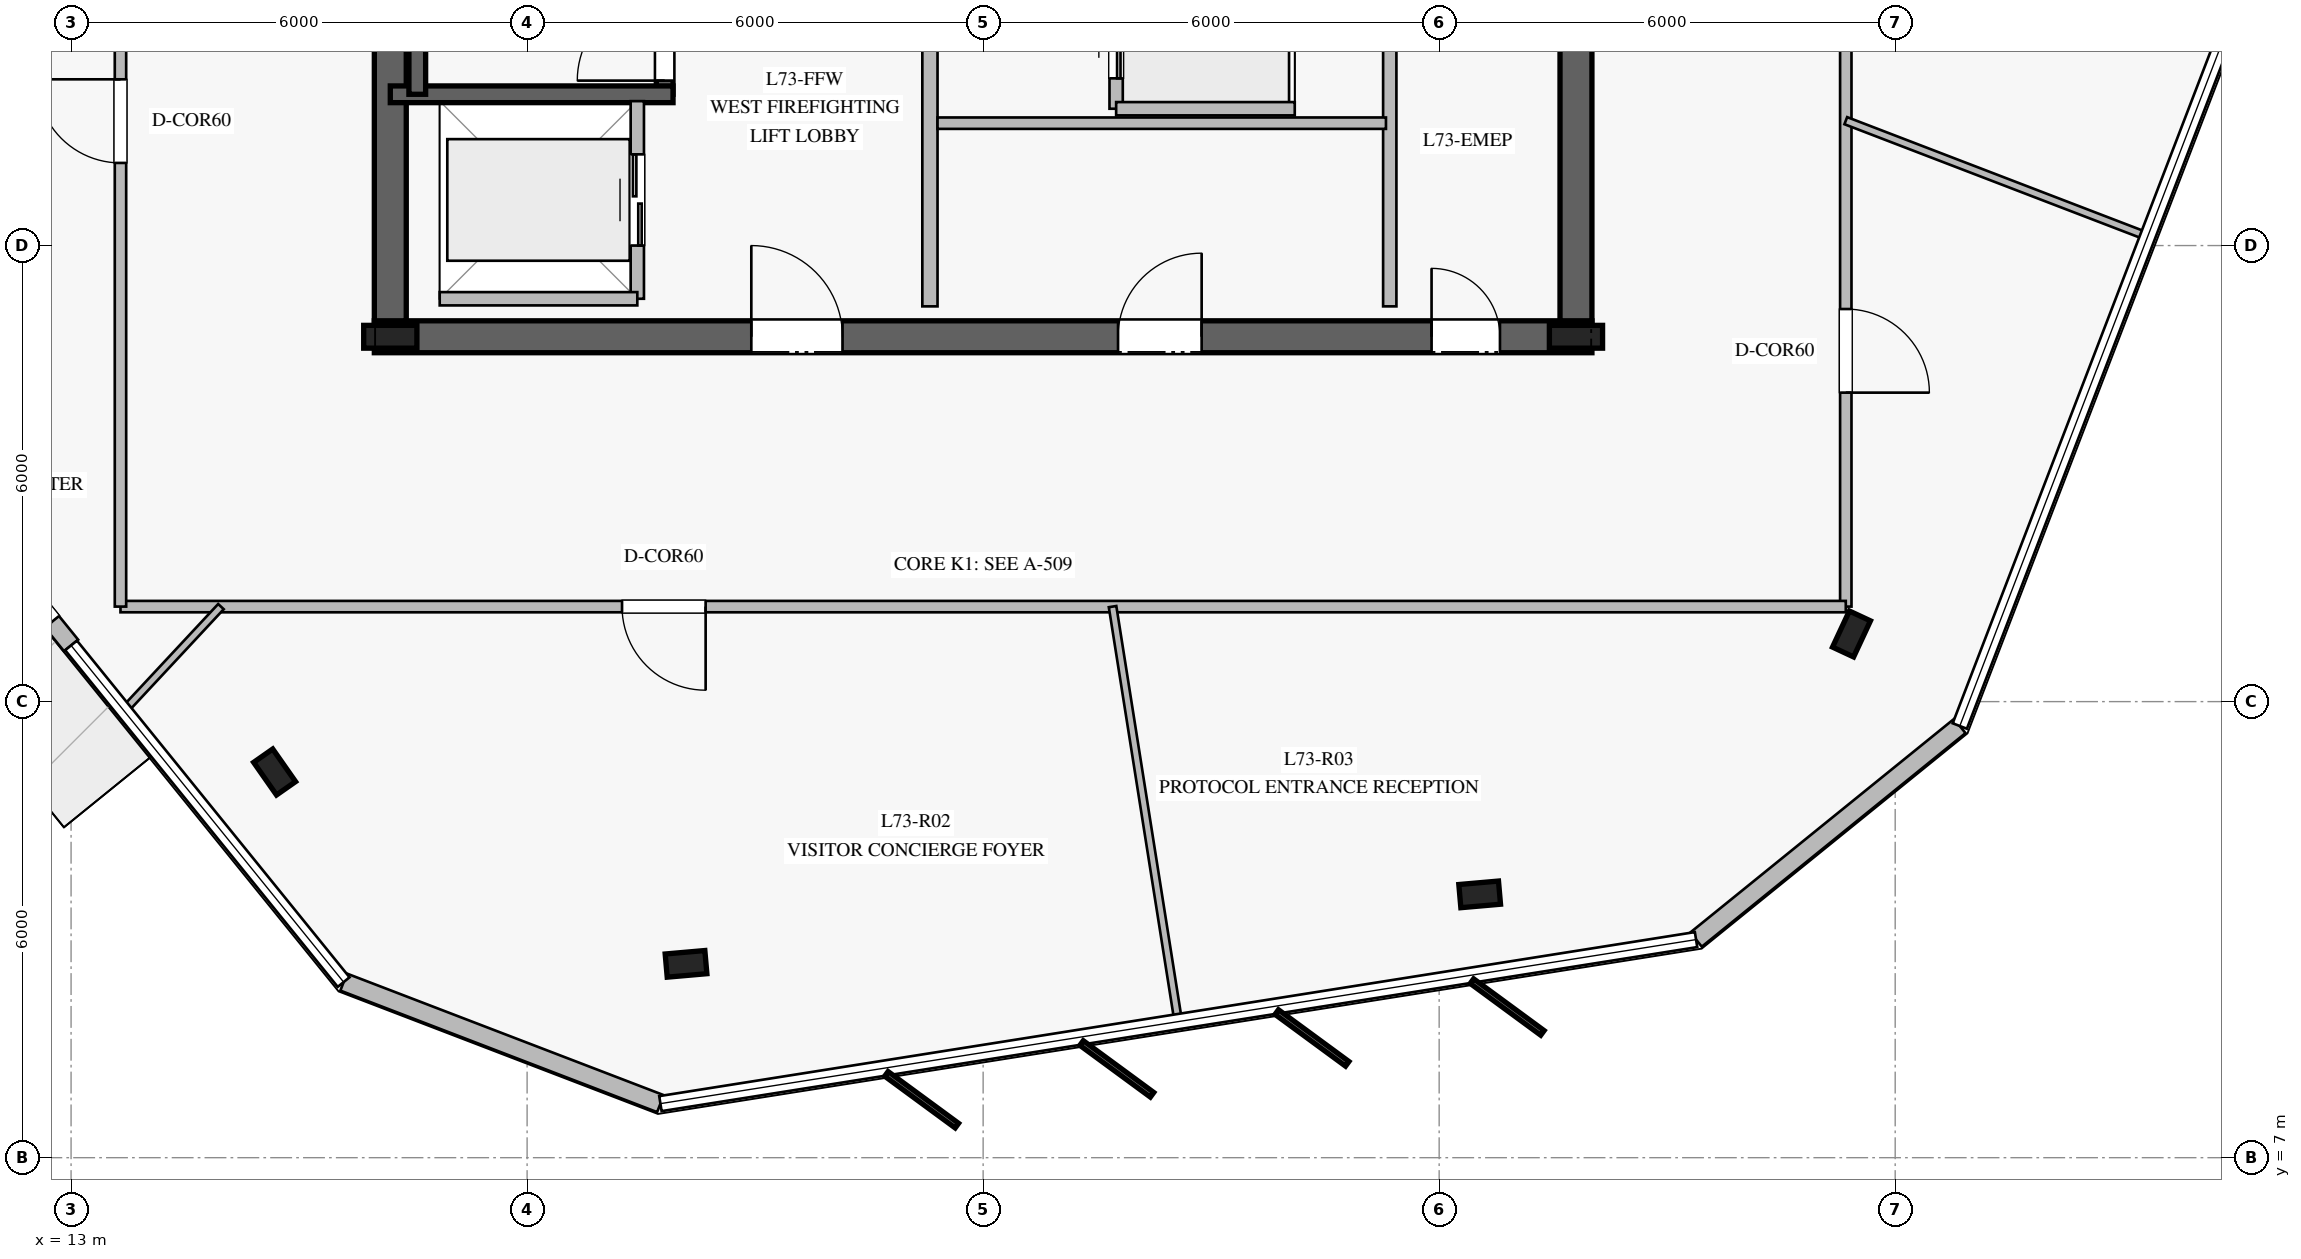
"""IFC4 building model, lengths in metres.
Left out: names, types, materials, properties, quantities, classifications, styles, units other than length and angle.
Written with IfcOpenShell. Run it as: python <this file> out.ifc"""

import sys

from ifc_helpers import new_model, si_unit, direction, frame, frame_2d, origin, origin_2d, place, context, subcontext, project, spatial, rectangle, i_section, extrude, element, fill, save


model = new_model("IFC4")
c1 = context("Model", 3, precision=1e-05, world=origin(), true_north=direction((0.0, 1.0)))
c2 = subcontext(c1, "Body", "Model", "MODEL_VIEW")
j1 = project(units=[si_unit("LENGTHUNIT", "METRE"), si_unit("PLANEANGLEUNIT", "RADIAN")], contexts=[c1])
p1 = place(None, origin())
s1 = spatial("IfcSite", under=j1, at=p1, CompositionType="ELEMENT")
p2 = place(p1, origin())
s2 = spatial("IfcBuilding", under=s1, at=p2, CompositionType="ELEMENT")
p3 = place(p2, frame((0.0, 0.0, 302.2)))
s3 = spatial("IfcBuildingStorey", under=s2, at=p3, CompositionType="ELEMENT", Elevation=302.2)
p4 = place(p3, frame((16.99, 17.8, 0.0), z_axis=(0.0, 0.0, 1.0), x_axis=(1.0, 0.0, 0.0)))
e1 = element("IfcWall", 1, at=p4, inside=s3, PredefinedType="SHEAR", context=c2, shape_type="SweptSolid", body=[
    extrude(rectangle(XDim=16.02, YDim=0.42, at=frame_2d((8.01, 0.0))), origin(), (0.0, 0.0, 1.0), 3.78),
])
p5 = place(p4, frame((4.96, 0.0, 0.0)))
e2 = element("IfcOpeningElement", 2, at=p5, cuts=e1, PredefinedType="OPENING", context=c2, shape_type="SweptSolid", body=[
    extrude(rectangle(XDim=1.2, YDim=2.25, at=frame_2d((0.6, 1.125))), frame((0.0, 0.22, 0.0), z_axis=(0.0, -1.0, 0.0), x_axis=(1.0, 0.0, 0.0)), (0.0, 0.0, 1.0), 0.44),
])
p6 = place(p4, frame((13.91, 0.0, 0.0)))
e3 = element("IfcOpeningElement", 3, at=p6, cuts=e1, PredefinedType="OPENING", context=c2, shape_type="SweptSolid", body=[
    extrude(rectangle(XDim=0.9, YDim=2.1, at=frame_2d((0.45, 1.05))), frame((0.0, 0.22, 0.0), z_axis=(0.0, -1.0, 0.0), x_axis=(1.0, 0.0, 0.0)), (0.0, 0.0, 1.0), 0.44),
])
p7 = place(p4, frame((9.785, 0.0, 0.0)))
e4 = element("IfcOpeningElement", 4, at=p7, cuts=e1, PredefinedType="OPENING", context=c2, shape_type="SweptSolid", body=[
    extrude(rectangle(XDim=1.1, YDim=2.2, at=frame_2d((0.55, 1.1))), frame((0.0, 0.22, 0.0), z_axis=(0.0, -1.0, 0.0), x_axis=(1.0, 0.0, 0.0)), (0.0, 0.0, 1.0), 0.44),
])
p8 = place(p3, frame((17.2, 31.99, 0.0), z_axis=(0.0, 0.0, 1.0), x_axis=(0.0, -1.0, 0.0)))
e5 = element("IfcWall", 5, at=p8, inside=s3, PredefinedType="SHEAR", context=c2, shape_type="SweptSolid", body=[
    extrude(rectangle(XDim=13.98, YDim=0.42, at=frame_2d((6.99, 0.0))), origin(), (0.0, 0.0, 1.0), 3.78),
])
p9 = place(p8, frame((2.14, 0.0, 0.0)))
e6 = element("IfcOpeningElement", 6, at=p9, cuts=e5, PredefinedType="OPENING", context=c2, shape_type="SweptSolid", body=[
    extrude(rectangle(XDim=1.5, YDim=2.2, at=frame_2d((0.75, 1.1))), frame((0.0, 0.22, 0.0), z_axis=(0.0, -1.0, 0.0), x_axis=(1.0, 0.0, 0.0)), (0.0, 0.0, 1.0), 0.44),
])
p10 = place(p3, frame((32.8, 18.01, 0.0), z_axis=(0.0, 0.0, 1.0), x_axis=(0.0, 1.0, 0.0)))
e7 = element("IfcWall", 7, at=p10, inside=s3, PredefinedType="SHEAR", context=c2, shape_type="SweptSolid", body=[
    extrude(rectangle(XDim=13.98, YDim=0.42, at=frame_2d((6.99, 0.0))), origin(), (0.0, 0.0, 1.0), 3.78),
])
for number, where, z_axis, x_axis in (
    (8, (17.2, 17.8, 0.0), (0.0, 0.0, 1.0), (1.0, 0.0, 0.0)),
    (9, (32.8, 17.8, 0.0), (0.0, 0.0, 1.0), (1.0, 0.0, 0.0)),
):
    element("IfcColumn", number, at=place(p3, frame(where, z_axis=z_axis, x_axis=x_axis)), inside=s3, PredefinedType="COLUMN", context=c2, shape_type="SweptSolid", body=[
        extrude(i_section(OverallWidth=0.3, OverallDepth=0.7, WebThickness=0.017, FlangeThickness=0.032, at=origin_2d()), origin(), (0.0, 0.0, 1.0), 4.0),
    ])
p11 = place(p3, frame((20.81, 20.99, 0.0), z_axis=(0.0, 0.0, 1.0), x_axis=(0.0, 1.0, 0.0)))
e10 = element("IfcWall", 10, at=p11, inside=s3, PredefinedType="SOLIDWALL", context=c2, shape_type="SweptSolid", body=[
    extrude(rectangle(XDim=7.22, YDim=0.22, at=frame_2d((3.61, 0.0))), origin(), (0.0, 0.0, 1.0), 3.78),
])
p12 = place(p11, frame((0.18, 0.0, 0.0)))
e11 = element("IfcOpeningElement", 11, at=p12, cuts=e10, PredefinedType="OPENING", context=c2, shape_type="SweptSolid", body=[
    extrude(rectangle(XDim=1.15, YDim=2.2, at=frame_2d((0.575, 1.1))), frame((0.0, 0.12, 0.0), z_axis=(0.0, -1.0, 0.0), x_axis=(1.0, 0.0, 0.0)), (0.0, 0.0, 1.0), 0.24),
])
p13 = place(p3, frame((17.2, 20.99, 0.0), z_axis=(0.0, 0.0, 1.0), x_axis=(1.0, 0.0, 0.0)))
e12 = element("IfcWall", 12, at=p13, inside=s3, PredefinedType="SOLIDWALL", context=c2, shape_type="SweptSolid", body=[
    extrude(rectangle(XDim=3.72, YDim=0.22, at=frame_2d((1.86, 0.0))), origin(), (0.0, 0.0, 1.0), 3.78),
])
p14 = place(p3, frame((17.555, 28.21, 0.0), z_axis=(0.0, 0.0, 1.0), x_axis=(0.0, -1.0, 0.0)))
e13 = element("IfcWall", 13, at=p14, inside=s3, PredefinedType="SOLIDWALL", context=c2, shape_type="SweptSolid", body=[
    extrude(rectangle(XDim=7.22, YDim=0.22, at=frame_2d((3.61, 0.0))), origin(), (0.0, 0.0, 1.0), 3.78),
])
for number, where, z_axis, x_axis in (
    (14, (15.678, 12.074, 0.0), (0.0, 0.0, 1.0), (-0.574, 0.819, 0.0)),
    (15, (21.091, 9.55, 0.0), (0.0, 0.0, 1.0), (0.996, 0.087, 0.0)),
    (16, (31.533, 10.464, 0.0), (0.0, 0.0, 1.0), (0.996, 0.087, 0.0)),
    (17, (36.425, 13.89, 0.0), (0.0, 0.0, 1.0), (0.423, 0.906, 0.0)),
):
    element("IfcColumn", number, at=place(p3, frame(where, z_axis=z_axis, x_axis=x_axis)), inside=s3, PredefinedType="COLUMN", context=c2, shape_type="SweptSolid", body=[
        extrude(i_section(OverallWidth=0.306, OverallDepth=0.524, WebThickness=0.021, FlangeThickness=0.04, at=origin_2d()), origin(), (0.0, 0.0, 1.0), 4.0),
    ])
p15 = place(p3, frame((11.489, 15.604, 0.0), z_axis=(0.0, 0.0, 1.0), x_axis=(0.629508336797, -0.776993728355, 0.0)))
e18 = element("IfcWall", 18, at=p15, inside=s3, PredefinedType="STANDARD", context=c2, shape_type="SweptSolid", body=[
    extrude(rectangle(XDim=2.4, YDim=0.24, at=frame_2d((1.2, 0.0))), origin(), (0.0, 0.0, 1.0), 3.78),
])
p16 = place(p15, frame((0.4, 0.0, 0.0)))
e19 = element("IfcOpeningElement", 19, at=p16, cuts=e18, PredefinedType="OPENING", context=c2, shape_type="SweptSolid", body=[
    extrude(rectangle(XDim=1.6, YDim=2.25, at=frame_2d((0.8, 1.125))), frame((0.0, 0.13, 0.0), z_axis=(0.0, -1.0, 0.0), x_axis=(1.0, 0.0, 0.0)), (0.0, 0.0, 1.0), 0.26),
])
p17 = place(p3, frame((16.586, 9.31, 0.0), z_axis=(0.0, 0.0, 1.0), x_axis=(0.933641283133, -0.358209372336, 0.0)))
e20 = element("IfcWall", 20, at=p17, inside=s3, PredefinedType="STANDARD", context=c2, shape_type="SweptSolid", body=[
    extrude(rectangle(XDim=4.464, YDim=0.24, at=frame_2d((2.232, 0.0))), origin(), (0.0, 0.0, 1.0), 3.78),
])
p18 = place(p3, frame((34.38, 9.869, 0.0), z_axis=(0.0, 0.0, 1.0), x_axis=(0.777153187888, 0.629311467046, 0.0)))
e21 = element("IfcWall", 21, at=p18, inside=s3, PredefinedType="STANDARD", context=c2, shape_type="SweptSolid", body=[
    extrude(rectangle(XDim=4.465, YDim=0.24, at=frame_2d((2.233, 0.0))), origin(), (0.0, 0.0, 1.0), 3.78),
])
p19 = place(p3, frame((24.3, 18.2, 0.0), z_axis=(0.0, 0.0, 1.0), x_axis=(0.0, 1.0, 0.0)))
e22 = element("IfcWall", 22, at=p19, inside=s3, PredefinedType="PARTITIONING", context=c2, shape_type="SweptSolid", body=[
    extrude(rectangle(XDim=5.15, YDim=0.2, at=frame_2d((2.575, 0.0))), origin(), (0.0, 0.0, 1.0), 3.78),
])
p20 = place(p3, frame((30.35, 18.2, 0.0), z_axis=(0.0, 0.0, 1.0), x_axis=(0.0, 1.0, 0.0)))
e23 = element("IfcWall", 23, at=p20, inside=s3, PredefinedType="PARTITIONING", context=c2, shape_type="SweptSolid", body=[
    extrude(rectangle(XDim=3.48, YDim=0.175, at=frame_2d((1.74, 0.0))), origin(), (0.0, 0.0, 1.0), 3.78),
])
p21 = place(p3, frame((24.4, 20.61, 0.0), z_axis=(0.0, 0.0, 1.0), x_axis=(1.0, 0.0, 0.0)))
e24 = element("IfcWall", 24, at=p21, inside=s3, PredefinedType="PARTITIONING", context=c2, shape_type="SweptSolid", body=[
    extrude(rectangle(XDim=5.9, YDim=0.15, at=frame_2d((2.95, 0.0))), origin(), (0.0, 0.0, 1.0), 3.78),
])
p22 = place(p3, frame((26.75, 20.8, 0.0), z_axis=(0.0, 0.0, 1.0), x_axis=(0.0, 1.0, 0.0)))
e25 = element("IfcWall", 25, at=p22, inside=s3, PredefinedType="PARTITIONING", context=c2, shape_type="SweptSolid", body=[
    extrude(rectangle(XDim=1.9, YDim=0.175, at=frame_2d((0.95, 0.0))), origin(), (0.0, 0.0, 1.0), 3.78),
])
p23 = place(p22, frame((0.4, 0.0, 0.0)))
e26 = element("IfcOpeningElement", 26, at=p23, cuts=e25, PredefinedType="OPENING", context=c2, shape_type="SweptSolid", body=[
    extrude(rectangle(XDim=1.1, YDim=2.2, at=frame_2d((0.55, 1.1))), frame((0.0, 0.098, 0.0), z_axis=(0.0, -1.0, 0.0), x_axis=(1.0, 0.0, 0.0)), (0.0, 0.0, 1.0), 0.195),
])
p24 = place(p3, frame((26.75, 20.8, 0.0), z_axis=(0.0, 0.0, 1.0), x_axis=(1.0, 0.0, 0.0)))
e27 = element("IfcWall", 27, at=p24, inside=s3, PredefinedType="PARTITIONING", context=c2, shape_type="SweptSolid", body=[
    extrude(rectangle(XDim=2.35, YDim=0.175, at=frame_2d((1.175, 0.0))), origin(), (0.0, 0.0, 1.0), 3.78),
])
p25 = place(p3, frame((20.45, 18.3, 0.0), z_axis=(0.0, 0.0, 1.0), x_axis=(0.0, 1.0, 0.0)))
e28 = element("IfcWall", 28, at=p25, inside=s3, PredefinedType="PARTITIONING", context=c2, shape_type="SweptSolid", body=[
    extrude(rectangle(XDim=2.6, YDim=0.175, at=frame_2d((1.3, 0.0))), origin(), (0.0, 0.0, 1.0), 3.78),
])
p26 = place(p25, frame((0.7, 0.0, 0.0)))
e29 = element("IfcOpeningElement", 29, at=p26, cuts=e28, PredefinedType="OPENING", context=c2, shape_type="SweptSolid", body=[
    extrude(rectangle(XDim=1.2, YDim=2.2, at=frame_2d((0.6, 1.1))), frame((0.0, 0.098, 0.0), z_axis=(0.0, -1.0, 0.0), x_axis=(1.0, 0.0, 0.0)), (0.0, 0.0, 1.0), 0.195),
])
p27 = place(p3, frame((17.85, 18.3, 0.0), z_axis=(0.0, 0.0, 1.0), x_axis=(1.0, 0.0, 0.0)))
e30 = element("IfcWall", 30, at=p27, inside=s3, PredefinedType="PARTITIONING", context=c2, shape_type="SweptSolid", body=[
    extrude(rectangle(XDim=2.6, YDim=0.175, at=frame_2d((1.3, 0.0))), origin(), (0.0, 0.0, 1.0), 3.78),
])
p28 = place(p3, frame((36.35, 35.75, 0.0), z_axis=(0.0, 0.0, 1.0), x_axis=(0.0, -1.0, 0.0)))
e31 = element("IfcWall", 31, at=p28, inside=s3, PredefinedType="PARTITIONING", context=c2, shape_type="SweptSolid", body=[
    extrude(rectangle(XDim=21.5, YDim=0.15, at=frame_2d((10.75, 0.0))), origin(), (0.0, 0.0, 1.0), 3.05),
])
p29 = place(p28, frame((17.585, 0.0, 0.0)))
e32 = element("IfcOpeningElement", 32, at=p29, cuts=e31, PredefinedType="OPENING", context=c2, shape_type="SweptSolid", body=[
    extrude(rectangle(XDim=1.1, YDim=2.2, at=frame_2d((0.55, 1.1))), frame((0.0, 0.085, 0.0), z_axis=(0.0, -1.0, 0.0), x_axis=(1.0, 0.0, 0.0)), (0.0, 0.0, 1.0), 0.17),
])
p30 = place(p28, frame((8.868, 0.0, 0.0)))
e33 = element("IfcOpeningElement", 33, at=p30, cuts=e31, PredefinedType="OPENING", context=c2, shape_type="SweptSolid", body=[
    extrude(rectangle(XDim=1.1, YDim=2.2, at=frame_2d((0.55, 1.1))), frame((0.0, 0.085, 0.0), z_axis=(0.0, -1.0, 0.0), x_axis=(1.0, 0.0, 0.0)), (0.0, 0.0, 1.0), 0.17),
])
p31 = place(p3, frame((36.35, 14.25, 0.0), z_axis=(0.0, 0.0, 1.0), x_axis=(-1.0, 0.0, 0.0)))
e34 = element("IfcWall", 34, at=p31, inside=s3, PredefinedType="PARTITIONING", context=c2, shape_type="SweptSolid", body=[
    extrude(rectangle(XDim=22.7, YDim=0.15, at=frame_2d((11.35, 0.0))), origin(), (0.0, 0.0, 1.0), 3.27),
])
p32 = place(p31, frame((15.001, 0.0, 0.0)))
e35 = element("IfcOpeningElement", 35, at=p32, cuts=e34, PredefinedType="OPENING", context=c2, shape_type="SweptSolid", body=[
    extrude(rectangle(XDim=1.1, YDim=2.2, at=frame_2d((0.55, 1.1))), frame((0.0, 0.085, 0.0), z_axis=(0.0, -1.0, 0.0), x_axis=(1.0, 0.0, 0.0)), (0.0, 0.0, 1.0), 0.17),
])
p33 = place(p3, frame((13.65, 14.25, 0.0), z_axis=(0.0, 0.0, 1.0), x_axis=(0.0, 1.0, 0.0)))
e36 = element("IfcWall", 36, at=p33, inside=s3, PredefinedType="PARTITIONING", context=c2, shape_type="SweptSolid", body=[
    extrude(rectangle(XDim=21.5, YDim=0.15, at=frame_2d((10.75, 0.0))), origin(), (0.0, 0.0, 1.0), 3.05),
])
p34 = place(p33, frame((5.837, 0.0, 0.0)))
e37 = element("IfcOpeningElement", 37, at=p34, cuts=e36, PredefinedType="OPENING", context=c2, shape_type="SweptSolid", body=[
    extrude(rectangle(XDim=1.1, YDim=2.2, at=frame_2d((0.55, 1.1))), frame((0.0, 0.085, 0.0), z_axis=(0.0, -1.0, 0.0), x_axis=(1.0, 0.0, 0.0)), (0.0, 0.0, 1.0), 0.17),
])
p35 = place(p3, frame((14.972, 14.25, 0.0), z_axis=(0.0, 0.0, 1.0), x_axis=(-0.681882363678, -0.731461852802, 0.0)))
e38 = element("IfcWall", 38, at=p35, inside=s3, PredefinedType="MOVABLE", context=c2, shape_type="SweptSolid", body=[
    extrude(rectangle(XDim=1.856, YDim=0.1, at=frame_2d((0.928, 0.0))), origin(), (0.0, 0.0, 1.0), 3.27),
])
p36 = place(p3, frame((26.703, 14.25, 0.0), z_axis=(0.0, 0.0, 1.0), x_axis=(0.156399265173, -0.987693915063, 0.0)))
e39 = element("IfcWall", 39, at=p36, inside=s3, PredefinedType="MOVABLE", context=c2, shape_type="SweptSolid", body=[
    extrude(rectangle(XDim=5.512, YDim=0.1, at=frame_2d((2.756, 0.0))), origin(), (0.0, 0.0, 1.0), 3.28),
])
p37 = place(p3, frame((36.35, 20.643, 0.0), z_axis=(0.0, 0.0, 1.0), x_axis=(0.933566635169, -0.358403875117, 0.0)))
e40 = element("IfcWall", 40, at=p37, inside=s3, PredefinedType="MOVABLE", context=c2, shape_type="SweptSolid", body=[
    extrude(rectangle(XDim=4.238, YDim=0.1, at=frame_2d((2.119, 0.0))), origin(), (0.0, 0.0, 1.0), 3.05),
])
p38 = place(p16, frame((1.6, 0.0, 0.0), z_axis=(0.0, 0.0, 1.0), x_axis=(-1.0, 0.0, 0.0)))
e41 = element("IfcDoor", 41, at=p38, inside=s3, OperationType="DOUBLE_DOOR_SINGLE_SWING", PredefinedType="DOOR", context=c2, shape_type="SweptSolid", body=[
    extrude(rectangle(XDim=1.6, YDim=2.25, at=frame_2d((0.8, 1.125))), frame((0.0, 0.025, 0.0), z_axis=(0.0, -1.0, 0.0), x_axis=(1.0, 0.0, 0.0)), (0.0, 0.0, 1.0), 0.05),
])
fill(e19, e41)
p39 = place(p12, origin())
e42 = element("IfcDoor", 42, at=p39, inside=s3, OperationType="SINGLE_SWING_LEFT", PredefinedType="DOOR", context=c2, shape_type="SweptSolid", body=[
    extrude(rectangle(XDim=1.15, YDim=2.2, at=frame_2d((0.575, 1.1))), frame((0.0, 0.025, 0.0), z_axis=(0.0, -1.0, 0.0), x_axis=(1.0, 0.0, 0.0)), (0.0, 0.0, 1.0), 0.05),
])
fill(e11, e42)
p40 = place(p5, origin())
e43 = element("IfcDoor", 43, at=p40, inside=s3, OperationType="SINGLE_SWING_LEFT", PredefinedType="DOOR", context=c2, shape_type="SweptSolid", body=[
    extrude(rectangle(XDim=1.2, YDim=2.25, at=frame_2d((0.6, 1.125))), frame((0.0, 0.025, 0.0), z_axis=(0.0, -1.0, 0.0), x_axis=(1.0, 0.0, 0.0)), (0.0, 0.0, 1.0), 0.05),
])
fill(e2, e43)
p41 = place(p6, origin())
e44 = element("IfcDoor", 44, at=p41, inside=s3, OperationType="SINGLE_SWING_LEFT", PredefinedType="DOOR", context=c2, shape_type="SweptSolid", body=[
    extrude(rectangle(XDim=0.9, YDim=2.1, at=frame_2d((0.45, 1.05))), frame((0.0, 0.025, 0.0), z_axis=(0.0, -1.0, 0.0), x_axis=(1.0, 0.0, 0.0)), (0.0, 0.0, 1.0), 0.05),
])
fill(e3, e44)
p42 = place(p7, origin())
e45 = element("IfcDoor", 45, at=p42, inside=s3, OperationType="SINGLE_SWING_RIGHT", PredefinedType="DOOR", context=c2, shape_type="SweptSolid", body=[
    extrude(rectangle(XDim=1.1, YDim=2.2, at=frame_2d((0.55, 1.1))), frame((0.0, 0.025, 0.0), z_axis=(0.0, -1.0, 0.0), x_axis=(1.0, 0.0, 0.0)), (0.0, 0.0, 1.0), 0.05),
])
fill(e4, e45)
p43 = place(p23, origin())
e46 = element("IfcDoor", 46, at=p43, inside=s3, OperationType="DOUBLE_DOOR_SLIDING", PredefinedType="DOOR", context=c2, shape_type="SweptSolid", body=[
    extrude(rectangle(XDim=1.1, YDim=2.2, at=frame_2d((0.55, 1.1))), frame((0.0, 0.025, 0.0), z_axis=(0.0, -1.0, 0.0), x_axis=(1.0, 0.0, 0.0)), (0.0, 0.0, 1.0), 0.05),
])
fill(e26, e46)
p44 = place(p26, origin())
e47 = element("IfcDoor", 47, at=p44, inside=s3, OperationType="DOUBLE_DOOR_SLIDING", PredefinedType="DOOR", context=c2, shape_type="SweptSolid", body=[
    extrude(rectangle(XDim=1.2, YDim=2.2, at=frame_2d((0.6, 1.1))), frame((0.0, 0.025, 0.0), z_axis=(0.0, -1.0, 0.0), x_axis=(1.0, 0.0, 0.0)), (0.0, 0.0, 1.0), 0.05),
])
fill(e29, e47)
p45 = place(p34, origin())
e48 = element("IfcDoor", 48, at=p45, inside=s3, OperationType="SINGLE_SWING_RIGHT", PredefinedType="DOOR", context=c2, shape_type="SweptSolid", body=[
    extrude(rectangle(XDim=1.1, YDim=2.2, at=frame_2d((0.55, 1.1))), frame((0.0, 0.025, 0.0), z_axis=(0.0, -1.0, 0.0), x_axis=(1.0, 0.0, 0.0)), (0.0, 0.0, 1.0), 0.05),
])
fill(e37, e48)
p46 = place(p32, origin())
e49 = element("IfcDoor", 49, at=p46, inside=s3, OperationType="SINGLE_SWING_LEFT", PredefinedType="DOOR", context=c2, shape_type="SweptSolid", body=[
    extrude(rectangle(XDim=1.1, YDim=2.2, at=frame_2d((0.55, 1.1))), frame((0.0, 0.025, 0.0), z_axis=(0.0, -1.0, 0.0), x_axis=(1.0, 0.0, 0.0)), (0.0, 0.0, 1.0), 0.05),
])
fill(e35, e49)
p47 = place(p29, origin())
e50 = element("IfcDoor", 50, at=p47, inside=s3, OperationType="SINGLE_SWING_RIGHT", PredefinedType="DOOR", context=c2, shape_type="SweptSolid", body=[
    extrude(rectangle(XDim=1.1, YDim=2.2, at=frame_2d((0.55, 1.1))), frame((0.0, 0.025, 0.0), z_axis=(0.0, -1.0, 0.0), x_axis=(1.0, 0.0, 0.0)), (0.0, 0.0, 1.0), 0.05),
])
fill(e32, e50)
save(model, sys.argv[1])
